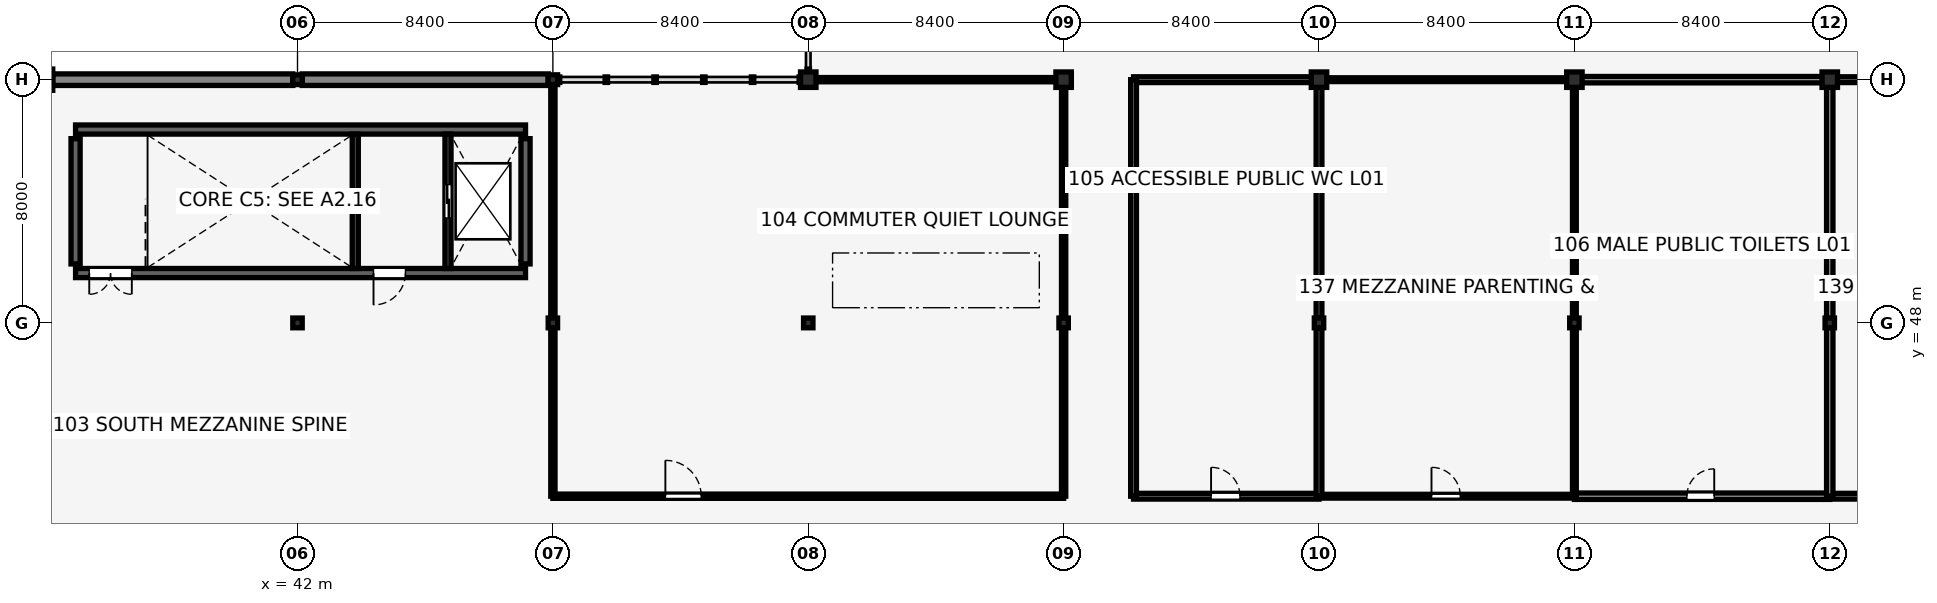
"""IFC4 building model, lengths in metres.
Left out: names, types, materials, properties, quantities, classifications, styles, units other than length and angle.
Written with IfcOpenShell. Run it as: python <this file> out.ifc"""

import sys

from ifc_helpers import new_model, si_unit, direction, frame, frame_2d, origin, origin_2d, place, context, subcontext, project, spatial, rectangle, hollow_circle, i_section, extrude, element, fill, save


model = new_model("IFC4")
c1 = context("Model", 3, precision=1e-05, world=origin(), true_north=direction((0.0, 1.0)))
c2 = subcontext(c1, "Body", "Model", "MODEL_VIEW")
j1 = project(units=[si_unit("LENGTHUNIT", "METRE"), si_unit("PLANEANGLEUNIT", "RADIAN")], contexts=[c1])
p1 = place(None, origin())
s1 = spatial("IfcSite", under=j1, at=p1, CompositionType="ELEMENT")
p2 = place(p1, origin())
s2 = spatial("IfcBuilding", under=s1, at=p2, CompositionType="ELEMENT")
p3 = place(p2, frame((0.0, 0.0, 5.44)))
s3 = spatial("IfcBuildingStorey", under=s2, at=p3, CompositionType="ELEMENT", Elevation=5.44)
p4 = place(p3, frame((34.7, 49.64, 0.0), z_axis=(0.0, 0.0, 1.0), x_axis=(1.0, 0.0, 0.0)))
e1 = element("IfcWall", 1, at=p4, inside=s3, PredefinedType="SHEAR", context=c2, shape_type="SweptSolid", body=[
    extrude(rectangle(XDim=14.8, YDim=0.3, at=frame_2d((7.4, 0.0))), origin(), (0.0, 0.0, 1.0), 3.8),
])
p5 = place(p4, frame((1.85, 0.0, 0.0), z_axis=(0.0, 0.0, 1.0), x_axis=(-1.0, 0.0, 0.0)))
e2 = element("IfcOpeningElement", 2, at=p5, cuts=e1, PredefinedType="OPENING", context=c2, shape_type="SweptSolid", body=[
    extrude(rectangle(XDim=1.4, YDim=2.15, at=frame_2d((0.7, 1.075))), frame((0.0, 0.16, 0.0), z_axis=(0.0, -1.0, 0.0), x_axis=(1.0, 0.0, 0.0)), (0.0, 0.0, 1.0), 0.32),
])
p6 = place(p4, frame((10.85, 0.0, 0.0), z_axis=(0.0, 0.0, 1.0), x_axis=(-1.0, 0.0, 0.0)))
e3 = element("IfcOpeningElement", 3, at=p6, cuts=e1, PredefinedType="OPENING", context=c2, shape_type="SweptSolid", body=[
    extrude(rectangle(XDim=1.05, YDim=2.15, at=frame_2d((0.525, 1.075))), frame((0.0, 0.16, 0.0), z_axis=(0.0, -1.0, 0.0), x_axis=(1.0, 0.0, 0.0)), (0.0, 0.0, 1.0), 0.32),
])
p7 = place(p3, frame((34.7, 54.36, 0.0), z_axis=(0.0, 0.0, 1.0), x_axis=(1.0, 0.0, 0.0)))
e4 = element("IfcWall", 4, at=p7, inside=s3, PredefinedType="SHEAR", context=c2, shape_type="SweptSolid", body=[
    extrude(rectangle(XDim=14.8, YDim=0.3, at=frame_2d((7.4, 0.0))), origin(), (0.0, 0.0, 1.0), 3.8),
])
for number, where, z_axis, x_axis in (
    (5, (34.7, 49.94, 0.0), (0.0, 0.0, 1.0), (0.0, 1.0, 0.0)),
    (6, (49.5, 49.94, 0.0), (0.0, 0.0, 1.0), (0.0, 1.0, 0.0)),
):
    element("IfcWall", number, at=place(p3, frame(where, z_axis=z_axis, x_axis=x_axis)), inside=s3, PredefinedType="SHEAR", context=c2, shape_type="SweptSolid", body=[
        extrude(rectangle(XDim=4.12, YDim=0.3, at=frame_2d((2.06, 0.0))), origin(), (0.0, 0.0, 1.0), 3.8),
    ])
p8 = place(p3, frame((33.6, 56.0, 0.0), z_axis=(0.0, 0.0, 1.0), x_axis=(1.0, 0.0, 0.0)))
e7 = element("IfcColumn", 7, at=p8, inside=s3, PredefinedType="COLUMN", context=c2, shape_type="SweptSolid", body=[
    extrude(rectangle(XDim=0.7, YDim=0.7, at=origin_2d()), origin(), (0.0, 0.0, 1.0), 3.8),
])
for number, where, z_axis, x_axis in (
    (8, (42.0, 48.0, 0.0), (0.0, 0.0, 1.0), (1.0, 0.0, 0.0)),
    (9, (42.0, 56.0, 0.0), (0.0, 0.0, 1.0), (1.0, 0.0, 0.0)),
    (10, (50.4, 48.0, 0.0), (0.0, 0.0, 1.0), (1.0, 0.0, 0.0)),
    (11, (50.4, 56.0, 0.0), (0.0, 0.0, 1.0), (1.0, 0.0, 0.0)),
    (12, (58.8, 48.0, 0.0), (0.0, 0.0, 1.0), (1.0, 0.0, 0.0)),
):
    element("IfcColumn", number, at=place(p3, frame(where, z_axis=z_axis, x_axis=x_axis)), inside=s3, PredefinedType="COLUMN", context=c2, shape_type="SweptSolid", body=[
        extrude(i_section(OverallWidth=0.309, OverallDepth=0.321, WebThickness=0.014, FlangeThickness=0.022, FilletRadius=0.015, at=origin_2d()), origin(), (0.0, 0.0, 1.0), 3.8),
    ])
p9 = place(p3, frame((58.8, 56.0, 0.0), z_axis=(0.0, 0.0, 1.0), x_axis=(1.0, 0.0, 0.0)))
e13 = element("IfcColumn", 13, at=p9, inside=s3, PredefinedType="COLUMN", context=c2, shape_type="SweptSolid", body=[
    extrude(hollow_circle(Radius=0.229, WallThickness=0.016, at=origin_2d()), origin(), (0.0, 0.0, 1.0), 16.28),
])
p10 = place(p3, frame((67.2, 48.0, 0.0), z_axis=(0.0, 0.0, 1.0), x_axis=(1.0, 0.0, 0.0)))
e14 = element("IfcColumn", 14, at=p10, inside=s3, PredefinedType="COLUMN", context=c2, shape_type="SweptSolid", body=[
    extrude(i_section(OverallWidth=0.309, OverallDepth=0.321, WebThickness=0.014, FlangeThickness=0.022, FilletRadius=0.015, at=origin_2d()), origin(), (0.0, 0.0, 1.0), 3.8),
])
p11 = place(p3, frame((67.2, 56.0, 0.0), z_axis=(0.0, 0.0, 1.0), x_axis=(1.0, 0.0, 0.0)))
e15 = element("IfcColumn", 15, at=p11, inside=s3, PredefinedType="COLUMN", context=c2, shape_type="SweptSolid", body=[
    extrude(hollow_circle(Radius=0.229, WallThickness=0.016, at=origin_2d()), origin(), (0.0, 0.0, 1.0), 12.952),
])
p12 = place(p3, frame((75.6, 48.0, 0.0), z_axis=(0.0, 0.0, 1.0), x_axis=(1.0, 0.0, 0.0)))
e16 = element("IfcColumn", 16, at=p12, inside=s3, PredefinedType="COLUMN", context=c2, shape_type="SweptSolid", body=[
    extrude(i_section(OverallWidth=0.309, OverallDepth=0.321, WebThickness=0.014, FlangeThickness=0.022, FilletRadius=0.015, at=origin_2d()), origin(), (0.0, 0.0, 1.0), 3.8),
])
p13 = place(p3, frame((75.6, 56.0, 0.0), z_axis=(0.0, 0.0, 1.0), x_axis=(1.0, 0.0, 0.0)))
e17 = element("IfcColumn", 17, at=p13, inside=s3, PredefinedType="COLUMN", context=c2, shape_type="SweptSolid", body=[
    extrude(hollow_circle(Radius=0.229, WallThickness=0.016, at=origin_2d()), origin(), (0.0, 0.0, 1.0), 11.288),
])
p14 = place(p3, frame((84.0, 48.0, 0.0), z_axis=(0.0, 0.0, 1.0), x_axis=(1.0, 0.0, 0.0)))
e18 = element("IfcColumn", 18, at=p14, inside=s3, PredefinedType="COLUMN", context=c2, shape_type="SweptSolid", body=[
    extrude(i_section(OverallWidth=0.309, OverallDepth=0.321, WebThickness=0.014, FlangeThickness=0.022, FilletRadius=0.015, at=origin_2d()), origin(), (0.0, 0.0, 1.0), 3.8),
])
p15 = place(p3, frame((84.0, 56.0, 0.0), z_axis=(0.0, 0.0, 1.0), x_axis=(1.0, 0.0, 0.0)))
e19 = element("IfcColumn", 19, at=p15, inside=s3, PredefinedType="COLUMN", context=c2, shape_type="SweptSolid", body=[
    extrude(hollow_circle(Radius=0.229, WallThickness=0.016, at=origin_2d()), origin(), (0.0, 0.0, 1.0), 11.288),
])
p16 = place(p3, frame((92.4, 48.0, 0.0), z_axis=(0.0, 0.0, 1.0), x_axis=(1.0, 0.0, 0.0)))
e20 = element("IfcColumn", 20, at=p16, inside=s3, PredefinedType="COLUMN", context=c2, shape_type="SweptSolid", body=[
    extrude(i_section(OverallWidth=0.309, OverallDepth=0.321, WebThickness=0.014, FlangeThickness=0.022, FilletRadius=0.015, at=origin_2d()), origin(), (0.0, 0.0, 1.0), 3.8),
])
p17 = place(p3, frame((92.4, 56.0, 0.0), z_axis=(0.0, 0.0, 1.0), x_axis=(1.0, 0.0, 0.0)))
e21 = element("IfcColumn", 21, at=p17, inside=s3, PredefinedType="COLUMN", context=c2, shape_type="SweptSolid", body=[
    extrude(hollow_circle(Radius=0.229, WallThickness=0.016, at=origin_2d()), origin(), (0.0, 0.0, 1.0), 12.952),
])
p18 = place(p3, frame((58.8, 56.0, 16.33), z_axis=(-0.104849381236, -0.104849381236, 0.988945506339), x_axis=(0.707106781187, -0.707106781187, 0.0)))
e22 = element("IfcColumn", 22, at=p18, inside=s3, PredefinedType="COLUMN", context=c2, shape_type="SweptSolid", body=[
    extrude(hollow_circle(Radius=0.254, WallThickness=0.02, at=origin_2d()), origin(), (0.0, 0.0, 1.0), 2.862),
])
p19 = place(p3, frame((67.2, 56.0, 13.002), z_axis=(0.0, -0.105430502232, 0.994426673616), x_axis=(1.0, 0.0, 0.0)))
e23 = element("IfcColumn", 23, at=p19, inside=s3, PredefinedType="COLUMN", context=c2, shape_type="SweptSolid", body=[
    extrude(hollow_circle(Radius=0.254, WallThickness=0.02, at=origin_2d()), origin(), (0.0, 0.0, 1.0), 2.846),
])
for number, where, z_axis, x_axis in (
    (24, (75.6, 56.0, 11.338), (0.0, -0.105, 0.994), (1.0, 0.0, 0.0)),
    (25, (84.0, 56.0, 11.338), (0.0, -0.105, 0.994), (1.0, 0.0, 0.0)),
):
    element("IfcColumn", number, at=place(p3, frame(where, z_axis=z_axis, x_axis=x_axis)), inside=s3, PredefinedType="COLUMN", context=c2, shape_type="SweptSolid", body=[
        extrude(hollow_circle(Radius=0.254, WallThickness=0.02, at=origin_2d()), origin(), (0.0, 0.0, 1.0), 2.846),
    ])
p20 = place(p3, frame((92.4, 56.0, 13.002), z_axis=(0.0, -0.105430502232, 0.994426673616), x_axis=(1.0, 0.0, 0.0)))
e26 = element("IfcColumn", 26, at=p20, inside=s3, PredefinedType="COLUMN", context=c2, shape_type="SweptSolid", body=[
    extrude(hollow_circle(Radius=0.254, WallThickness=0.02, at=origin_2d()), origin(), (0.0, 0.0, 1.0), 2.846),
])
p21 = place(p3, frame((33.95, 56.0, 0.0), z_axis=(0.0, 0.0, 1.0), x_axis=(1.0, 0.0, 0.0)))
e27 = element("IfcWall", 27, at=p21, inside=s3, PredefinedType="SOLIDWALL", context=c2, shape_type="SweptSolid", body=[
    extrude(rectangle(XDim=7.896, YDim=0.38, at=frame_2d((3.948, 0.0))), origin(), (0.0, 0.0, 1.0), 3.45),
])
p22 = place(p3, frame((42.155, 56.0, 0.0), z_axis=(0.0, 0.0, 1.0), x_axis=(1.0, 0.0, 0.0)))
e28 = element("IfcWall", 28, at=p22, inside=s3, PredefinedType="SOLIDWALL", context=c2, shape_type="SweptSolid", body=[
    extrude(rectangle(XDim=8.091, YDim=0.38, at=frame_2d((4.045, 0.0))), origin(), (0.0, 0.0, 1.0), 3.45),
])
p23 = place(p3, frame((43.9, 49.79, 0.0), z_axis=(0.0, 0.0, 1.0), x_axis=(0.0, 1.0, 0.0)))
e29 = element("IfcWall", 29, at=p23, inside=s3, PredefinedType="SHEAR", context=c2, shape_type="SweptSolid", body=[
    extrude(rectangle(XDim=4.42, YDim=0.2, at=frame_2d((2.21, 0.0))), origin(), (0.0, 0.0, 1.0), 3.8),
])
p24 = place(p3, frame((46.95, 49.79, 0.0), z_axis=(0.0, 0.0, 1.0), x_axis=(0.0, 1.0, 0.0)))
e30 = element("IfcWall", 30, at=p24, inside=s3, PredefinedType="SHEAR", context=c2, shape_type="SweptSolid", body=[
    extrude(rectangle(XDim=4.42, YDim=0.2, at=frame_2d((2.21, 0.0))), origin(), (0.0, 0.0, 1.0), 3.8),
])
p25 = place(p24, frame((1.66, 0.0, 0.0), z_axis=(0.0, 0.0, 1.0), x_axis=(1.0, 0.0, 0.0)))
e31 = element("IfcOpeningElement", 31, at=p25, cuts=e30, PredefinedType="OPENING", context=c2, shape_type="SweptSolid", body=[
    extrude(rectangle(XDim=1.1, YDim=2.15, at=frame_2d((0.55, 1.075))), frame((0.0, 0.11, 0.0), z_axis=(0.0, -1.0, 0.0), x_axis=(1.0, 0.0, 0.0)), (0.0, 0.0, 1.0), 0.22),
])
p26 = place(p3, frame((50.4, 42.3, 0.0), z_axis=(0.0, 0.0, 1.0), x_axis=(1.0, 0.0, 0.0)))
e32 = element("IfcWall", 32, at=p26, inside=s3, PredefinedType="PARTITIONING", context=c2, shape_type="SweptSolid", body=[
    extrude(rectangle(XDim=16.8, YDim=0.14, at=frame_2d((8.4, 0.0))), origin(), (0.0, 0.0, 1.0), 3.8),
])
p27 = place(p26, frame((3.7, 0.0, 0.0), z_axis=(0.0, 0.0, 1.0), x_axis=(1.0, 0.0, 0.0)))
e33 = element("IfcOpeningElement", 33, at=p27, cuts=e32, PredefinedType="OPENING", context=c2, shape_type="SweptSolid", body=[
    extrude(rectangle(XDim=1.18, YDim=2.22, at=frame_2d((0.59, 1.11))), frame((0.0, 0.08, 0.0), z_axis=(0.0, -1.0, 0.0), x_axis=(1.0, 0.0, 0.0)), (0.0, 0.0, 1.0), 0.16),
])
p28 = place(p3, frame((69.5, 42.3, 0.0), z_axis=(0.0, 0.0, 1.0), x_axis=(1.0, 0.0, 0.0)))
e34 = element("IfcWall", 34, at=p28, inside=s3, PredefinedType="PLUMBINGWALL", context=c2, shape_type="SweptSolid", body=[
    extrude(rectangle(XDim=6.1, YDim=0.19, at=frame_2d((3.05, 0.0))), origin(), (0.0, 0.0, 1.0), 3.8),
])
p29 = place(p28, frame((2.55, 0.0, 0.0), z_axis=(0.0, 0.0, 1.0), x_axis=(1.0, 0.0, 0.0)))
e35 = element("IfcOpeningElement", 35, at=p29, cuts=e34, PredefinedType="OPENING", context=c2, shape_type="SweptSolid", body=[
    extrude(rectangle(XDim=0.95, YDim=2.15, at=frame_2d((0.475, 1.075))), frame((0.0, 0.105, 0.0), z_axis=(0.0, -1.0, 0.0), x_axis=(1.0, 0.0, 0.0)), (0.0, 0.0, 1.0), 0.21),
])
p30 = place(p3, frame((75.6, 42.3, 0.0), z_axis=(0.0, 0.0, 1.0), x_axis=(1.0, 0.0, 0.0)))
e36 = element("IfcWall", 36, at=p30, inside=s3, PredefinedType="PARTITIONING", context=c2, shape_type="SweptSolid", body=[
    extrude(rectangle(XDim=8.4, YDim=0.125, at=frame_2d((4.2, 0.0))), origin(), (0.0, 0.0, 1.0), 3.8),
])
p31 = place(p30, frame((3.7, 0.0, 0.0), z_axis=(0.0, 0.0, 1.0), x_axis=(1.0, 0.0, 0.0)))
e37 = element("IfcOpeningElement", 37, at=p31, cuts=e36, PredefinedType="OPENING", context=c2, shape_type="SweptSolid", body=[
    extrude(rectangle(XDim=0.95, YDim=2.15, at=frame_2d((0.475, 1.075))), frame((0.0, 0.073, 0.0), z_axis=(0.0, -1.0, 0.0), x_axis=(1.0, 0.0, 0.0)), (0.0, 0.0, 1.0), 0.145),
])
p32 = place(p3, frame((84.0, 42.3, 0.0), z_axis=(0.0, 0.0, 1.0), x_axis=(1.0, 0.0, 0.0)))
e38 = element("IfcWall", 38, at=p32, inside=s3, PredefinedType="PLUMBINGWALL", context=c2, shape_type="SweptSolid", body=[
    extrude(rectangle(XDim=8.4, YDim=0.21, at=frame_2d((4.2, 0.0))), origin(), (0.0, 0.0, 1.0), 3.8),
])
p33 = place(p32, frame((3.7, 0.0, 0.0), z_axis=(0.0, 0.0, 1.0), x_axis=(1.0, 0.0, 0.0)))
e39 = element("IfcOpeningElement", 39, at=p33, cuts=e38, PredefinedType="OPENING", context=c2, shape_type="SweptSolid", body=[
    extrude(rectangle(XDim=0.9, YDim=2.15, at=frame_2d((0.45, 1.075))), frame((0.0, 0.115, 0.0), z_axis=(0.0, -1.0, 0.0), x_axis=(1.0, 0.0, 0.0)), (0.0, 0.0, 1.0), 0.23),
])
p34 = place(p3, frame((92.4, 42.3, 0.0), z_axis=(0.0, 0.0, 1.0), x_axis=(1.0, 0.0, 0.0)))
e40 = element("IfcWall", 40, at=p34, inside=s3, PredefinedType="PLUMBINGWALL", context=c2, shape_type="SweptSolid", body=[
    extrude(rectangle(XDim=8.4, YDim=0.19, at=frame_2d((4.2, 0.0))), origin(), (0.0, 0.0, 1.0), 3.8),
])
p35 = place(p34, frame((3.7, 0.0, 0.0), z_axis=(0.0, 0.0, 1.0), x_axis=(1.0, 0.0, 0.0)))
e41 = element("IfcOpeningElement", 41, at=p35, cuts=e40, PredefinedType="OPENING", context=c2, shape_type="SweptSolid", body=[
    extrude(rectangle(XDim=0.95, YDim=2.15, at=frame_2d((0.475, 1.075))), frame((0.0, 0.105, 0.0), z_axis=(0.0, -1.0, 0.0), x_axis=(1.0, 0.0, 0.0)), (0.0, 0.0, 1.0), 0.21),
])
p36 = place(p3, frame((59.019, 56.0, 0.0), z_axis=(0.0, 0.0, 1.0), x_axis=(1.0, 0.0, 0.0)))
e42 = element("IfcWall", 42, at=p36, inside=s3, PredefinedType="PARTITIONING", context=c2, shape_type="SweptSolid", body=[
    extrude(rectangle(XDim=7.963, YDim=0.14, at=frame_2d((3.981, 0.0))), origin(), (0.0, 0.0, 1.0), 3.8),
])
p37 = place(p3, frame((50.4, 42.3, 0.0), z_axis=(0.0, 0.0, 1.0), x_axis=(0.0, 1.0, 0.0)))
e43 = element("IfcWall", 43, at=p37, inside=s3, PredefinedType="PARTITIONING", context=c2, shape_type="SweptSolid", body=[
    extrude(rectangle(XDim=5.55, YDim=0.14, at=frame_2d((2.775, 0.0))), origin(), (0.0, 0.0, 1.0), 3.337),
])
p38 = place(p3, frame((50.4, 48.15, 0.0), z_axis=(0.0, 0.0, 1.0), x_axis=(0.0, 1.0, 0.0)))
e44 = element("IfcWall", 44, at=p38, inside=s3, PredefinedType="PARTITIONING", context=c2, shape_type="SweptSolid", body=[
    extrude(rectangle(XDim=7.699, YDim=0.14, at=frame_2d((3.85, 0.0))), origin(), (0.0, 0.0, 1.0), 3.337),
])
p39 = place(p3, frame((67.2, 42.3, 0.0), z_axis=(0.0, 0.0, 1.0), x_axis=(0.0, 1.0, 0.0)))
e45 = element("IfcWall", 45, at=p39, inside=s3, PredefinedType="PARTITIONING", context=c2, shape_type="SweptSolid", body=[
    extrude(rectangle(XDim=5.55, YDim=0.14, at=frame_2d((2.775, 0.0))), origin(), (0.0, 0.0, 1.0), 3.337),
])
p40 = place(p3, frame((67.2, 48.15, 0.0), z_axis=(0.0, 0.0, 1.0), x_axis=(0.0, 1.0, 0.0)))
e46 = element("IfcWall", 46, at=p40, inside=s3, PredefinedType="PARTITIONING", context=c2, shape_type="SweptSolid", body=[
    extrude(rectangle(XDim=7.631, YDim=0.14, at=frame_2d((3.815, 0.0))), origin(), (0.0, 0.0, 1.0), 3.337),
])
p41 = place(p3, frame((69.5, 56.0, 0.0), z_axis=(0.0, 0.0, 1.0), x_axis=(1.0, 0.0, 0.0)))
e47 = element("IfcWall", 47, at=p41, inside=s3, PredefinedType="PLUMBINGWALL", context=c2, shape_type="SweptSolid", body=[
    extrude(rectangle(XDim=5.882, YDim=0.19, at=frame_2d((2.941, 0.0))), origin(), (0.0, 0.0, 1.0), 3.8),
])
p42 = place(p3, frame((69.5, 42.3, 0.0), z_axis=(0.0, 0.0, 1.0), x_axis=(0.0, 1.0, 0.0)))
e48 = element("IfcWall", 48, at=p42, inside=s3, PredefinedType="PLUMBINGWALL", context=c2, shape_type="SweptSolid", body=[
    extrude(rectangle(XDim=13.7, YDim=0.19, at=frame_2d((6.85, 0.0))), origin(), (0.0, 0.0, 1.0), 3.8),
])
p43 = place(p3, frame((75.6, 42.3, 0.0), z_axis=(0.0, 0.0, 1.0), x_axis=(0.0, 1.0, 0.0)))
e49 = element("IfcWall", 49, at=p43, inside=s3, PredefinedType="PLUMBINGWALL", context=c2, shape_type="SweptSolid", body=[
    extrude(rectangle(XDim=5.55, YDim=0.19, at=frame_2d((2.775, 0.0))), origin(), (0.0, 0.0, 1.0), 3.337),
])
p44 = place(p3, frame((75.6, 48.15, 0.0), z_axis=(0.0, 0.0, 1.0), x_axis=(0.0, 1.0, 0.0)))
e50 = element("IfcWall", 50, at=p44, inside=s3, PredefinedType="PLUMBINGWALL", context=c2, shape_type="SweptSolid", body=[
    extrude(rectangle(XDim=7.631, YDim=0.19, at=frame_2d((3.815, 0.0))), origin(), (0.0, 0.0, 1.0), 3.337),
])
p45 = place(p3, frame((75.819, 56.0, 0.0), z_axis=(0.0, 0.0, 1.0), x_axis=(1.0, 0.0, 0.0)))
e51 = element("IfcWall", 51, at=p45, inside=s3, PredefinedType="PARTITIONING", context=c2, shape_type="SweptSolid", body=[
    extrude(rectangle(XDim=7.963, YDim=0.125, at=frame_2d((3.981, 0.0))), origin(), (0.0, 0.0, 1.0), 3.8),
])
p46 = place(p3, frame((84.0, 42.3, 0.0), z_axis=(0.0, 0.0, 1.0), x_axis=(0.0, 1.0, 0.0)))
e52 = element("IfcWall", 52, at=p46, inside=s3, PredefinedType="PARTITIONING", context=c2, shape_type="SweptSolid", body=[
    extrude(rectangle(XDim=5.55, YDim=0.125, at=frame_2d((2.775, 0.0))), origin(), (0.0, 0.0, 1.0), 3.337),
])
p47 = place(p3, frame((84.0, 48.15, 0.0), z_axis=(0.0, 0.0, 1.0), x_axis=(0.0, 1.0, 0.0)))
e53 = element("IfcWall", 53, at=p47, inside=s3, PredefinedType="PARTITIONING", context=c2, shape_type="SweptSolid", body=[
    extrude(rectangle(XDim=7.631, YDim=0.125, at=frame_2d((3.815, 0.0))), origin(), (0.0, 0.0, 1.0), 3.337),
])
p48 = place(p3, frame((84.219, 56.0, 0.0), z_axis=(0.0, 0.0, 1.0), x_axis=(1.0, 0.0, 0.0)))
e54 = element("IfcWall", 54, at=p48, inside=s3, PredefinedType="PLUMBINGWALL", context=c2, shape_type="SweptSolid", body=[
    extrude(rectangle(XDim=7.963, YDim=0.21, at=frame_2d((3.981, 0.0))), origin(), (0.0, 0.0, 1.0), 3.8),
])
p49 = place(p3, frame((92.4, 42.3, 0.0), z_axis=(0.0, 0.0, 1.0), x_axis=(0.0, 1.0, 0.0)))
e55 = element("IfcWall", 55, at=p49, inside=s3, PredefinedType="PLUMBINGWALL", context=c2, shape_type="SweptSolid", body=[
    extrude(rectangle(XDim=5.55, YDim=0.21, at=frame_2d((2.775, 0.0))), origin(), (0.0, 0.0, 1.0), 3.337),
])
p50 = place(p3, frame((92.4, 48.15, 0.0), z_axis=(0.0, 0.0, 1.0), x_axis=(0.0, 1.0, 0.0)))
e56 = element("IfcWall", 56, at=p50, inside=s3, PredefinedType="PLUMBINGWALL", context=c2, shape_type="SweptSolid", body=[
    extrude(rectangle(XDim=7.631, YDim=0.21, at=frame_2d((3.815, 0.0))), origin(), (0.0, 0.0, 1.0), 3.337),
])
p51 = place(p3, frame((92.618, 56.0, 0.0), z_axis=(0.0, 0.0, 1.0), x_axis=(1.0, 0.0, 0.0)))
e57 = element("IfcWall", 57, at=p51, inside=s3, PredefinedType="PLUMBINGWALL", context=c2, shape_type="SweptSolid", body=[
    extrude(rectangle(XDim=7.963, YDim=0.19, at=frame_2d((3.981, 0.0))), origin(), (0.0, 0.0, 1.0), 3.8),
])
p52 = place(p5, origin())
e58 = element("IfcDoor", 58, at=p52, inside=s3, OperationType="DOUBLE_DOOR_SINGLE_SWING", PredefinedType="DOOR", context=c2, shape_type="SweptSolid", body=[
    extrude(rectangle(XDim=1.4, YDim=2.15, at=frame_2d((0.7, 1.075))), frame((0.0, 0.025, 0.0), z_axis=(0.0, -1.0, 0.0), x_axis=(1.0, 0.0, 0.0)), (0.0, 0.0, 1.0), 0.05),
])
fill(e2, e58)
p53 = place(p6, origin())
e59 = element("IfcDoor", 59, at=p53, inside=s3, OperationType="SINGLE_SWING_RIGHT", PredefinedType="DOOR", context=c2, shape_type="SweptSolid", body=[
    extrude(rectangle(XDim=1.05, YDim=2.15, at=frame_2d((0.525, 1.075))), frame((0.0, 0.025, 0.0), z_axis=(0.0, -1.0, 0.0), x_axis=(1.0, 0.0, 0.0)), (0.0, 0.0, 1.0), 0.05),
])
fill(e3, e59)
p54 = place(p25, origin())
e60 = element("IfcDoor", 60, at=p54, inside=s3, OperationType="DOUBLE_DOOR_SLIDING", PredefinedType="DOOR", context=c2, shape_type="SweptSolid", body=[
    extrude(rectangle(XDim=1.1, YDim=2.15, at=frame_2d((0.55, 1.075))), frame((0.0, 0.025, 0.0), z_axis=(0.0, -1.0, 0.0), x_axis=(1.0, 0.0, 0.0)), (0.0, 0.0, 1.0), 0.05),
])
fill(e31, e60)
p55 = place(p27, origin())
e61 = element("IfcDoor", 61, at=p55, inside=s3, OperationType="SINGLE_SWING_LEFT", PredefinedType="DOOR", context=c2, shape_type="SweptSolid", body=[
    extrude(rectangle(XDim=1.18, YDim=2.22, at=frame_2d((0.59, 1.11))), frame((0.0, 0.025, 0.0), z_axis=(0.0, -1.0, 0.0), x_axis=(1.0, 0.0, 0.0)), (0.0, 0.0, 1.0), 0.05),
])
fill(e33, e61)
p56 = place(p29, origin())
e62 = element("IfcDoor", 62, at=p56, inside=s3, OperationType="SINGLE_SWING_LEFT", PredefinedType="DOOR", context=c2, shape_type="SweptSolid", body=[
    extrude(rectangle(XDim=0.95, YDim=2.15, at=frame_2d((0.475, 1.075))), frame((0.0, 0.025, 0.0), z_axis=(0.0, -1.0, 0.0), x_axis=(1.0, 0.0, 0.0)), (0.0, 0.0, 1.0), 0.05),
])
fill(e35, e62)
p57 = place(p31, origin())
e63 = element("IfcDoor", 63, at=p57, inside=s3, OperationType="SINGLE_SWING_LEFT", PredefinedType="DOOR", context=c2, shape_type="SweptSolid", body=[
    extrude(rectangle(XDim=0.95, YDim=2.15, at=frame_2d((0.475, 1.075))), frame((0.0, 0.025, 0.0), z_axis=(0.0, -1.0, 0.0), x_axis=(1.0, 0.0, 0.0)), (0.0, 0.0, 1.0), 0.05),
])
fill(e37, e63)
p58 = place(p33, origin())
e64 = element("IfcDoor", 64, at=p58, inside=s3, OperationType="SINGLE_SWING_RIGHT", PredefinedType="DOOR", context=c2, shape_type="SweptSolid", body=[
    extrude(rectangle(XDim=0.9, YDim=2.15, at=frame_2d((0.45, 1.075))), frame((0.0, 0.025, 0.0), z_axis=(0.0, -1.0, 0.0), x_axis=(1.0, 0.0, 0.0)), (0.0, 0.0, 1.0), 0.05),
])
fill(e39, e64)
save(model, sys.argv[1])
